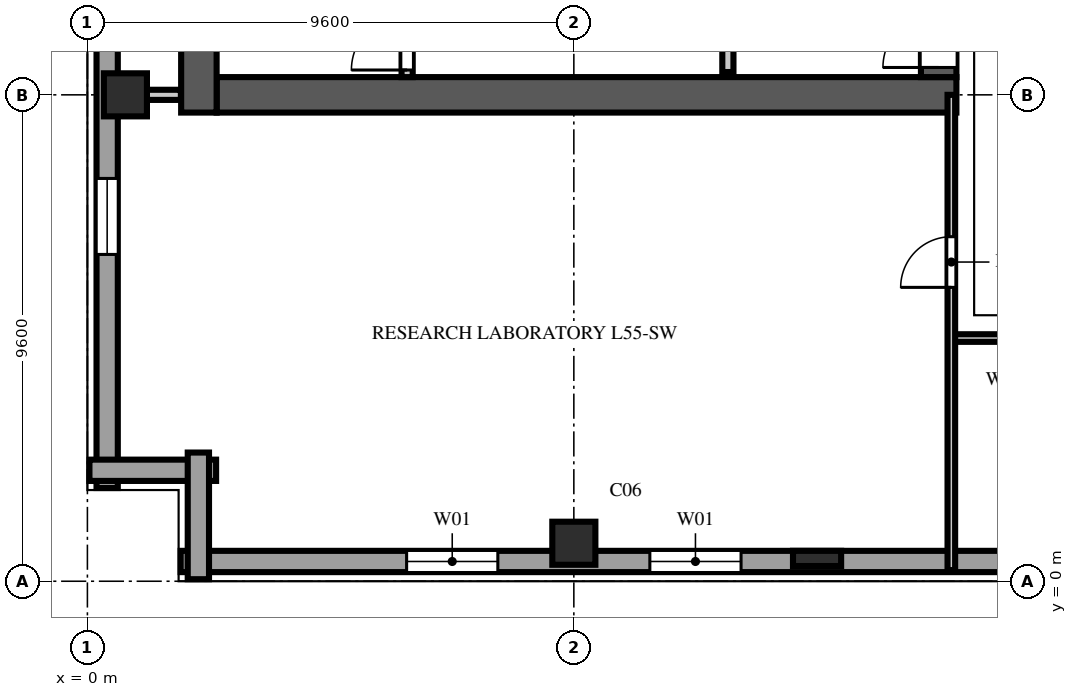
"""IFC4 building model, lengths in metres.
Left out: names, types, materials, properties, quantities, classifications, styles, units other than length and angle.
Written with IfcOpenShell. Run it as: python <this file> out.ifc"""

import sys

from ifc_helpers import new_model, si_unit, direction, frame, frame_2d, origin, origin_2d, place, context, subcontext, project, spatial, rectangle, extrude, element, fill, save


model = new_model("IFC4")
c1 = context("Model", 3, precision=1e-05, world=origin(), true_north=direction((0.0, 1.0)))
c2 = subcontext(c1, "Body", "Model", "MODEL_VIEW")
j1 = project(units=[si_unit("LENGTHUNIT", "METRE"), si_unit("PLANEANGLEUNIT", "RADIAN")], contexts=[c1])
p1 = place(None, origin())
s1 = spatial("IfcSite", under=j1, at=p1, CompositionType="ELEMENT")
p2 = place(p1, origin())
s2 = spatial("IfcBuilding", under=s1, at=p2, CompositionType="ELEMENT")
p3 = place(p2, frame((0.0, 0.0, 218.0)))
s3 = spatial("IfcBuildingStorey", under=s2, at=p3, CompositionType="ELEMENT", Elevation=218.0)
p4 = place(p3, frame((2.55, 9.6, 0.0), z_axis=(0.0, 0.0, 1.0), x_axis=(1.0, 0.0, 0.0)))
e1 = element("IfcWall", 1, at=p4, inside=s3, PredefinedType="SHEAR", context=c2, shape_type="SweptSolid", body=[
    extrude(rectangle(XDim=14.6, YDim=0.7, at=frame_2d((7.3, 0.0))), origin(), (0.0, 0.0, 1.0), 3.54),
])
p5 = place(p3, frame((2.2, 9.25, 0.0), z_axis=(0.0, 0.0, 1.0), x_axis=(0.0, 1.0, 0.0)))
e2 = element("IfcWall", 2, at=p5, inside=s3, PredefinedType="SHEAR", context=c2, shape_type="SweptSolid", body=[
    extrude(rectangle(XDim=39.1, YDim=0.7, at=frame_2d((19.55, 0.0))), origin(), (0.0, 0.0, 1.0), 3.54),
])
p6 = place(p3, frame((16.8, 9.95, 0.0), z_axis=(0.0, 0.0, 1.0), x_axis=(0.0, 1.0, 0.0)))
e3 = element("IfcWall", 3, at=p6, inside=s3, PredefinedType="SHEAR", context=c2, shape_type="SweptSolid", body=[
    extrude(rectangle(XDim=12.45, YDim=0.7, at=frame_2d((6.225, 0.0))), origin(), (0.0, 0.0, 1.0), 3.54),
])
p7 = place(p6, frame((0.19, 0.0, 0.0)))
e4 = element("IfcOpeningElement", 4, at=p7, cuts=e3, PredefinedType="OPENING", context=c2, shape_type="SweptSolid", body=[
    extrude(rectangle(XDim=1.1, YDim=2.2, at=frame_2d((0.55, 1.1))), frame((0.0, 0.362, 0.0), z_axis=(0.0, -1.0, 0.0), x_axis=(1.0, 0.0, 0.0)), (0.0, 0.0, 1.0), 0.724),
])
for number, where, z_axis, x_axis in (
    (5, (0.75, 9.6, 0.0), (0.0, 0.0, 1.0), (1.0, 0.0, 0.0)),
    (6, (9.6, 0.75, 0.0), (0.0, 0.0, 1.0), (1.0, 0.0, 0.0)),
):
    element("IfcColumn", number, at=place(p3, frame(where, z_axis=z_axis, x_axis=x_axis)), inside=s3, PredefinedType="COLUMN", context=c2, shape_type="SweptSolid", body=[
        extrude(rectangle(XDim=0.85, YDim=0.85, at=origin_2d()), origin(), (0.0, 0.0, 1.0), 3.8),
    ])
p8 = place(p3, frame((14.4, 0.45, 0.0), z_axis=(0.0, 0.0, 1.0), x_axis=(1.0, 0.0, 0.0)))
e7 = element("IfcColumn", 7, at=p8, inside=s3, PredefinedType="PILASTER", context=c2, shape_type="SweptSolid", body=[
    extrude(rectangle(XDim=0.95, YDim=0.3, at=origin_2d()), origin(), (0.0, 0.0, 1.0), 3.8),
])
p9 = place(p3, frame((1.84, 0.39, 0.0), z_axis=(0.0, 0.0, 1.0), x_axis=(1.0, 0.0, 0.0)))
e8 = element("IfcWall", 8, at=p9, inside=s3, PredefinedType="SOLIDWALL", context=c2, shape_type="SweptSolid", body=[
    extrude(rectangle(XDim=53.92, YDim=0.42, at=frame_2d((26.96, 0.0))), origin(), (0.0, 0.0, 1.0), 3.54),
])
p10 = place(p9, frame((4.46, 0.0, 0.85)))
e9 = element("IfcOpeningElement", 9, at=p10, cuts=e8, PredefinedType="OPENING", context=c2, shape_type="SweptSolid", body=[
    extrude(rectangle(XDim=1.8, YDim=1.85, at=frame_2d((0.9, 0.925))), frame((0.0, 0.222, 0.0), z_axis=(0.0, -1.0, 0.0), x_axis=(1.0, 0.0, 0.0)), (0.0, 0.0, 1.0), 0.444),
])
p11 = place(p9, frame((9.26, 0.0, 0.85)))
e10 = element("IfcOpeningElement", 10, at=p11, cuts=e8, PredefinedType="OPENING", context=c2, shape_type="SweptSolid", body=[
    extrude(rectangle(XDim=1.8, YDim=1.85, at=frame_2d((0.9, 0.925))), frame((0.0, 0.222, 0.0), z_axis=(0.0, -1.0, 0.0), x_axis=(1.0, 0.0, 0.0)), (0.0, 0.0, 1.0), 0.444),
])
p12 = place(p9, frame((18.86, 0.0, 0.85)))
e11 = element("IfcOpeningElement", 11, at=p12, cuts=e8, PredefinedType="OPENING", context=c2, shape_type="SweptSolid", body=[
    extrude(rectangle(XDim=1.8, YDim=1.85, at=frame_2d((0.9, 0.925))), frame((0.0, 0.222, 0.0), z_axis=(0.0, -1.0, 0.0), x_axis=(1.0, 0.0, 0.0)), (0.0, 0.0, 1.0), 0.444),
])
p13 = place(p9, frame((28.46, 0.0, 0.85)))
e12 = element("IfcOpeningElement", 12, at=p13, cuts=e8, PredefinedType="OPENING", context=c2, shape_type="SweptSolid", body=[
    extrude(rectangle(XDim=1.8, YDim=1.85, at=frame_2d((0.9, 0.925))), frame((0.0, 0.222, 0.0), z_axis=(0.0, -1.0, 0.0), x_axis=(1.0, 0.0, 0.0)), (0.0, 0.0, 1.0), 0.444),
])
p14 = place(p9, frame((33.26, 0.0, 0.85)))
e13 = element("IfcOpeningElement", 13, at=p14, cuts=e8, PredefinedType="OPENING", context=c2, shape_type="SweptSolid", body=[
    extrude(rectangle(XDim=1.8, YDim=1.85, at=frame_2d((0.9, 0.925))), frame((0.0, 0.222, 0.0), z_axis=(0.0, -1.0, 0.0), x_axis=(1.0, 0.0, 0.0)), (0.0, 0.0, 1.0), 0.444),
])
p15 = place(p9, frame((38.06, 0.0, 0.85)))
e14 = element("IfcOpeningElement", 14, at=p15, cuts=e8, PredefinedType="OPENING", context=c2, shape_type="SweptSolid", body=[
    extrude(rectangle(XDim=1.8, YDim=1.85, at=frame_2d((0.9, 0.925))), frame((0.0, 0.222, 0.0), z_axis=(0.0, -1.0, 0.0), x_axis=(1.0, 0.0, 0.0)), (0.0, 0.0, 1.0), 0.444),
])
p16 = place(p9, frame((42.86, 0.0, 0.85)))
e15 = element("IfcOpeningElement", 15, at=p16, cuts=e8, PredefinedType="OPENING", context=c2, shape_type="SweptSolid", body=[
    extrude(rectangle(XDim=1.8, YDim=1.85, at=frame_2d((0.9, 0.925))), frame((0.0, 0.222, 0.0), z_axis=(0.0, -1.0, 0.0), x_axis=(1.0, 0.0, 0.0)), (0.0, 0.0, 1.0), 0.444),
])
p17 = place(p9, frame((47.66, 0.0, 0.85)))
e16 = element("IfcOpeningElement", 16, at=p17, cuts=e8, PredefinedType="OPENING", context=c2, shape_type="SweptSolid", body=[
    extrude(rectangle(XDim=1.8, YDim=1.85, at=frame_2d((0.9, 0.925))), frame((0.0, 0.222, 0.0), z_axis=(0.0, -1.0, 0.0), x_axis=(1.0, 0.0, 0.0)), (0.0, 0.0, 1.0), 0.444),
])
p18 = place(p3, frame((0.39, 55.76, 0.0), z_axis=(0.0, 0.0, 1.0), x_axis=(0.0, -1.0, 0.0)))
e17 = element("IfcWall", 17, at=p18, inside=s3, PredefinedType="SOLIDWALL", context=c2, shape_type="SweptSolid", body=[
    extrude(rectangle(XDim=53.92, YDim=0.42, at=frame_2d((26.96, 0.0))), origin(), (0.0, 0.0, 1.0), 3.54),
])
p19 = place(p18, frame((4.885, 0.0, 0.9)))
e18 = element("IfcOpeningElement", 18, at=p19, cuts=e17, PredefinedType="OPENING", context=c2, shape_type="SweptSolid", body=[
    extrude(rectangle(XDim=0.95, YDim=1.85, at=frame_2d((0.475, 0.925))), frame((0.0, 0.222, 0.0), z_axis=(0.0, -1.0, 0.0), x_axis=(1.0, 0.0, 0.0)), (0.0, 0.0, 1.0), 0.444),
])
p20 = place(p18, frame((9.41, 0.0, 0.9)))
e19 = element("IfcOpeningElement", 19, at=p20, cuts=e17, PredefinedType="OPENING", context=c2, shape_type="SweptSolid", body=[
    extrude(rectangle(XDim=1.5, YDim=1.85, at=frame_2d((0.75, 0.925))), frame((0.0, 0.222, 0.0), z_axis=(0.0, -1.0, 0.0), x_axis=(1.0, 0.0, 0.0)), (0.0, 0.0, 1.0), 0.444),
])
p21 = place(p18, frame((14.485, 0.0, 0.9)))
e20 = element("IfcOpeningElement", 20, at=p21, cuts=e17, PredefinedType="OPENING", context=c2, shape_type="SweptSolid", body=[
    extrude(rectangle(XDim=0.95, YDim=1.85, at=frame_2d((0.475, 0.925))), frame((0.0, 0.222, 0.0), z_axis=(0.0, -1.0, 0.0), x_axis=(1.0, 0.0, 0.0)), (0.0, 0.0, 1.0), 0.444),
])
p22 = place(p18, frame((19.01, 0.0, 0.9)))
e21 = element("IfcOpeningElement", 21, at=p22, cuts=e17, PredefinedType="OPENING", context=c2, shape_type="SweptSolid", body=[
    extrude(rectangle(XDim=1.5, YDim=1.85, at=frame_2d((0.75, 0.925))), frame((0.0, 0.222, 0.0), z_axis=(0.0, -1.0, 0.0), x_axis=(1.0, 0.0, 0.0)), (0.0, 0.0, 1.0), 0.444),
])
p23 = place(p18, frame((24.085, 0.0, 0.9)))
e22 = element("IfcOpeningElement", 22, at=p23, cuts=e17, PredefinedType="OPENING", context=c2, shape_type="SweptSolid", body=[
    extrude(rectangle(XDim=0.95, YDim=1.85, at=frame_2d((0.475, 0.925))), frame((0.0, 0.222, 0.0), z_axis=(0.0, -1.0, 0.0), x_axis=(1.0, 0.0, 0.0)), (0.0, 0.0, 1.0), 0.444),
])
p24 = place(p18, frame((28.61, 0.0, 0.9)))
e23 = element("IfcOpeningElement", 23, at=p24, cuts=e17, PredefinedType="OPENING", context=c2, shape_type="SweptSolid", body=[
    extrude(rectangle(XDim=1.5, YDim=1.85, at=frame_2d((0.75, 0.925))), frame((0.0, 0.222, 0.0), z_axis=(0.0, -1.0, 0.0), x_axis=(1.0, 0.0, 0.0)), (0.0, 0.0, 1.0), 0.444),
])
p25 = place(p18, frame((33.685, 0.0, 0.9)))
e24 = element("IfcOpeningElement", 24, at=p25, cuts=e17, PredefinedType="OPENING", context=c2, shape_type="SweptSolid", body=[
    extrude(rectangle(XDim=0.95, YDim=1.85, at=frame_2d((0.475, 0.925))), frame((0.0, 0.222, 0.0), z_axis=(0.0, -1.0, 0.0), x_axis=(1.0, 0.0, 0.0)), (0.0, 0.0, 1.0), 0.444),
])
p26 = place(p18, frame((38.21, 0.0, 0.9)))
e25 = element("IfcOpeningElement", 25, at=p26, cuts=e17, PredefinedType="OPENING", context=c2, shape_type="SweptSolid", body=[
    extrude(rectangle(XDim=1.5, YDim=1.85, at=frame_2d((0.75, 0.925))), frame((0.0, 0.222, 0.0), z_axis=(0.0, -1.0, 0.0), x_axis=(1.0, 0.0, 0.0)), (0.0, 0.0, 1.0), 0.444),
])
p27 = place(p18, frame((43.285, 0.0, 0.9)))
e26 = element("IfcOpeningElement", 26, at=p27, cuts=e17, PredefinedType="OPENING", context=c2, shape_type="SweptSolid", body=[
    extrude(rectangle(XDim=0.95, YDim=1.85, at=frame_2d((0.475, 0.925))), frame((0.0, 0.222, 0.0), z_axis=(0.0, -1.0, 0.0), x_axis=(1.0, 0.0, 0.0)), (0.0, 0.0, 1.0), 0.444),
])
p28 = place(p18, frame((47.81, 0.0, 0.9)))
e27 = element("IfcOpeningElement", 27, at=p28, cuts=e17, PredefinedType="OPENING", context=c2, shape_type="SweptSolid", body=[
    extrude(rectangle(XDim=1.5, YDim=1.85, at=frame_2d((0.75, 0.925))), frame((0.0, 0.222, 0.0), z_axis=(0.0, -1.0, 0.0), x_axis=(1.0, 0.0, 0.0)), (0.0, 0.0, 1.0), 0.444),
])
for number, where, z_axis, x_axis in (
    (28, (0.04, 2.19, 0.0), (0.0, 0.0, 1.0), (1.0, 0.0, 0.0)),
    (29, (2.19, 2.54, 0.0), (0.0, 0.0, 1.0), (0.0, -1.0, 0.0)),
):
    element("IfcWall", number, at=place(p3, frame(where, z_axis=z_axis, x_axis=x_axis)), inside=s3, PredefinedType="SOLIDWALL", context=c2, shape_type="SweptSolid", body=[
        extrude(rectangle(XDim=2.5, YDim=0.42, at=frame_2d((1.25, 0.0))), origin(), (0.0, 0.0, 1.0), 3.54),
    ])
p29 = place(p3, frame((6.31, 9.95, 0.0), z_axis=(0.0, 0.0, 1.0), x_axis=(0.0, 1.0, 0.0)))
e30 = element("IfcWall", 30, at=p29, inside=s3, PredefinedType="SOLIDWALL", context=c2, shape_type="SweptSolid", body=[
    extrude(rectangle(XDim=7.81, YDim=0.22, at=frame_2d((3.905, 0.0))), origin(), (0.0, 0.0, 1.0), 3.54),
])
p30 = place(p29, frame((0.14, 0.0, 0.0)))
e31 = element("IfcOpeningElement", 31, at=p30, cuts=e30, PredefinedType="OPENING", context=c2, shape_type="SweptSolid", body=[
    extrude(rectangle(XDim=1.1, YDim=2.2, at=frame_2d((0.55, 1.1))), frame((0.0, 0.122, 0.0), z_axis=(0.0, -1.0, 0.0), x_axis=(1.0, 0.0, 0.0)), (0.0, 0.0, 1.0), 0.244),
])
p31 = place(p3, frame((12.64, 10.05, 0.0), z_axis=(0.0, 0.0, 1.0), x_axis=(0.0, 1.0, 0.0)))
e32 = element("IfcWall", 32, at=p31, inside=s3, PredefinedType="SOLIDWALL", context=c2, shape_type="SweptSolid", body=[
    extrude(rectangle(XDim=7.71, YDim=0.22, at=frame_2d((3.855, 0.0))), origin(), (0.0, 0.0, 1.0), 3.54),
])
p32 = place(p3, frame((0.85, 9.6, 0.0), z_axis=(0.0, 0.0, 1.0), x_axis=(1.0, 0.0, 0.0)))
e33 = element("IfcWall", 33, at=p32, inside=s3, PredefinedType="SOLIDWALL", context=c2, shape_type="SweptSolid", body=[
    extrude(rectangle(XDim=0.995, YDim=0.2, at=frame_2d((0.498, 0.0))), origin(), (0.0, 0.0, 1.0), 2.924),
])
p33 = place(p3, frame((17.05, 4.8, 0.0), z_axis=(0.0, 0.0, 1.0), x_axis=(1.0, 0.0, 0.0)))
e34 = element("IfcWall", 34, at=p33, inside=s3, PredefinedType="PARTITIONING", context=c2, shape_type="SweptSolid", body=[
    extrude(rectangle(XDim=2.15, YDim=0.15, at=frame_2d((1.075, 0.0))), origin(), (0.0, 0.0, 1.0), 3.54),
])
p34 = place(p3, frame((17.05, 0.22, 0.0), z_axis=(0.0, 0.0, 1.0), x_axis=(0.0, 1.0, 0.0)))
e35 = element("IfcWall", 35, at=p34, inside=s3, PredefinedType="PARTITIONING", context=c2, shape_type="SweptSolid", body=[
    extrude(rectangle(XDim=9.38, YDim=0.15, at=frame_2d((4.69, 0.0))), origin(), (0.0, 0.0, 1.0), 3.54),
])
p35 = place(p34, frame((5.58, 0.0, 0.0)))
e36 = element("IfcOpeningElement", 36, at=p35, cuts=e35, PredefinedType="OPENING", context=c2, shape_type="SweptSolid", body=[
    extrude(rectangle(XDim=1.0, YDim=2.2, at=frame_2d((0.5, 1.1))), frame((0.0, 0.087, 0.0), z_axis=(0.0, -1.0, 0.0), x_axis=(1.0, 0.0, 0.0)), (0.0, 0.0, 1.0), 0.174),
])
p36 = place(p10, origin())
e37 = element("IfcWindow", 37, at=p36, inside=s3, PartitioningType="DOUBLE_PANEL_VERTICAL", PredefinedType="WINDOW", context=c2, shape_type="SweptSolid", body=[
    extrude(rectangle(XDim=1.8, YDim=1.85, at=frame_2d((0.9, 0.925))), frame((0.0, 0.11, 0.0), z_axis=(0.0, -1.0, 0.0), x_axis=(1.0, 0.0, 0.0)), (0.0, 0.0, 1.0), 0.06),
])
fill(e9, e37)
p37 = place(p11, origin())
e38 = element("IfcWindow", 38, at=p37, inside=s3, PartitioningType="DOUBLE_PANEL_VERTICAL", PredefinedType="WINDOW", context=c2, shape_type="SweptSolid", body=[
    extrude(rectangle(XDim=1.8, YDim=1.85, at=frame_2d((0.9, 0.925))), frame((0.0, 0.11, 0.0), z_axis=(0.0, -1.0, 0.0), x_axis=(1.0, 0.0, 0.0)), (0.0, 0.0, 1.0), 0.06),
])
fill(e10, e38)
p38 = place(p28, origin())
e39 = element("IfcWindow", 39, at=p38, inside=s3, PartitioningType="DOUBLE_PANEL_VERTICAL", PredefinedType="WINDOW", context=c2, shape_type="SweptSolid", body=[
    extrude(rectangle(XDim=1.5, YDim=1.85, at=frame_2d((0.75, 0.925))), frame((0.0, 0.11, 0.0), z_axis=(0.0, -1.0, 0.0), x_axis=(1.0, 0.0, 0.0)), (0.0, 0.0, 1.0), 0.06),
])
fill(e27, e39)
p39 = place(p30, origin())
e40 = element("IfcDoor", 40, at=p39, inside=s3, OperationType="SINGLE_SWING_LEFT", PredefinedType="DOOR", context=c2, shape_type="SweptSolid", body=[
    extrude(rectangle(XDim=1.1, YDim=2.2, at=frame_2d((0.55, 1.1))), frame((0.0, 0.025, 0.0), z_axis=(0.0, -1.0, 0.0), x_axis=(1.0, 0.0, 0.0)), (0.0, 0.0, 1.0), 0.05),
])
fill(e31, e40)
p40 = place(p7, origin())
e41 = element("IfcDoor", 41, at=p40, inside=s3, OperationType="SINGLE_SWING_LEFT", PredefinedType="DOOR", context=c2, shape_type="SweptSolid", body=[
    extrude(rectangle(XDim=1.1, YDim=2.2, at=frame_2d((0.55, 1.1))), frame((0.0, 0.025, 0.0), z_axis=(0.0, -1.0, 0.0), x_axis=(1.0, 0.0, 0.0)), (0.0, 0.0, 1.0), 0.05),
])
fill(e4, e41)
p41 = place(p35, origin())
e42 = element("IfcDoor", 42, at=p41, inside=s3, OperationType="SINGLE_SWING_LEFT", PredefinedType="DOOR", context=c2, shape_type="SweptSolid", body=[
    extrude(rectangle(XDim=1.0, YDim=2.2, at=frame_2d((0.5, 1.1))), frame((0.0, 0.025, 0.0), z_axis=(0.0, -1.0, 0.0), x_axis=(1.0, 0.0, 0.0)), (0.0, 0.0, 1.0), 0.05),
])
fill(e36, e42)
save(model, sys.argv[1])
